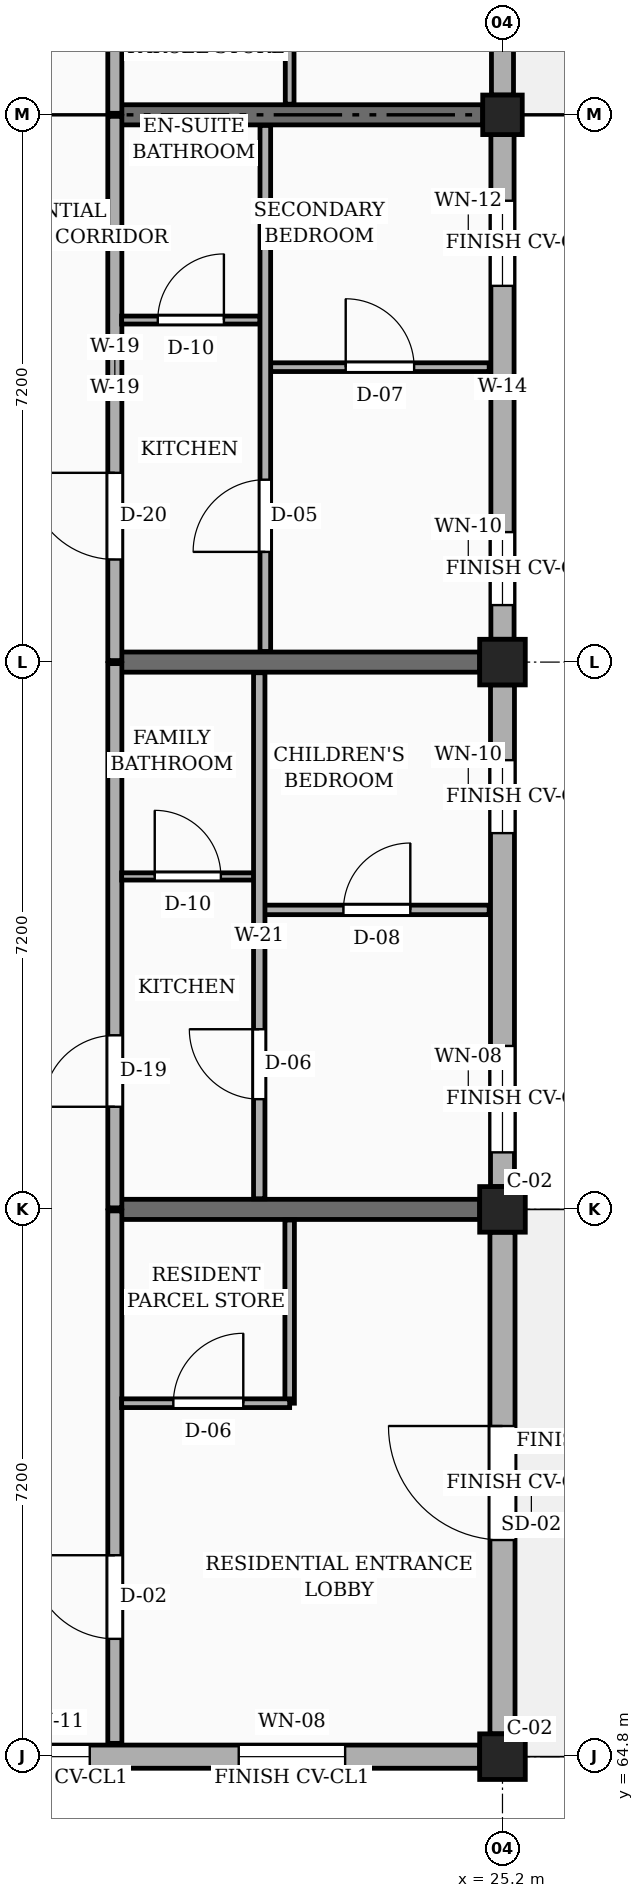
"""IFC4 building model, lengths in metres.
Left out: names, types, materials, properties, quantities, classifications, styles, units other than length and angle.
Written with IfcOpenShell. Run it as: python <this file> out.ifc"""

import sys

from ifc_helpers import new_model, si_unit, direction, frame, frame_2d, origin, origin_2d, place, context, subcontext, project, spatial, rectangle, circle, extrude, element, fill, save


model = new_model("IFC4")
c1 = context("Model", 3, precision=1e-05, world=origin(), true_north=direction((0.0, 1.0)))
c2 = subcontext(c1, "Body", "Model", "MODEL_VIEW")
j1 = project(units=[si_unit("LENGTHUNIT", "METRE"), si_unit("PLANEANGLEUNIT", "RADIAN")], contexts=[c1])
p1 = place(None, origin())
s1 = spatial("IfcSite", under=j1, at=p1, CompositionType="ELEMENT")
p2 = place(p1, origin())
s2 = spatial("IfcBuilding", under=s1, at=p2, CompositionType="ELEMENT")
p3 = place(p2, origin())
s3 = spatial("IfcBuildingStorey", under=s2, at=p3, CompositionType="ELEMENT", Elevation=0.0)
for number, where, z_axis, x_axis in (
    (1, (25.2, 64.8, 0.0), (0.0, 0.0, 1.0), (1.0, 0.0, 0.0)),
    (2, (25.2, 72.0, 0.0), (0.0, 0.0, 1.0), (1.0, 0.0, 0.0)),
    (3, (25.2, 79.2, 0.0), (0.0, 0.0, 1.0), (1.0, 0.0, 0.0)),
):
    element("IfcColumn", number, at=place(p3, frame(where, z_axis=z_axis, x_axis=x_axis)), inside=s3, PredefinedType="COLUMN", context=c2, shape_type="SweptSolid", body=[
        extrude(rectangle(XDim=0.6, YDim=0.6, at=origin_2d()), origin(), (0.0, 0.0, 1.0), 4.5),
    ])
p4 = place(p3, frame((25.2, 86.4, 0.0), z_axis=(0.0, 0.0, 1.0), x_axis=(1.0, 0.0, 0.0)))
e4 = element("IfcColumn", 4, at=p4, inside=s3, PredefinedType="COLUMN", context=c2, shape_type="SweptSolid", body=[
    extrude(circle(Radius=0.26, at=origin_2d()), origin(), (0.0, 0.0, 1.0), 4.5),
])
for number, where, z_axis, x_axis in (
    (5, (20.1, 72.0, 0.0), (0.0, 0.0, 1.0), (1.0, 0.0, 0.0)),
    (6, (20.1, 79.2, 0.0), (0.0, 0.0, 1.0), (1.0, 0.0, 0.0)),
):
    element("IfcWall", number, at=place(p3, frame(where, z_axis=z_axis, x_axis=x_axis)), inside=s3, PredefinedType="SOLIDWALL", context=c2, shape_type="SweptSolid", body=[
        extrude(rectangle(XDim=4.8, YDim=0.265, at=frame_2d((2.4, 0.0))), origin(), (0.0, 0.0, 1.0), 3.56),
    ])
p5 = place(p3, frame((20.1, 86.4, 0.0), z_axis=(0.0, 0.0, 1.0), x_axis=(1.0, 0.0, 0.0)))
e7 = element("IfcWall", 7, at=p5, inside=s3, PredefinedType="SOLIDWALL", context=c2, shape_type="SweptSolid", body=[
    extrude(rectangle(XDim=4.84, YDim=0.265, at=frame_2d((2.42, 0.0))), origin(), (0.0, 0.0, 1.0), 3.56),
])
p6 = place(p3, frame((18.26, 64.8, 0.0), z_axis=(0.0, 0.0, 1.0), x_axis=(1.0, 0.0, 0.0)))
e8 = element("IfcWall", 8, at=p6, inside=s3, PredefinedType="SOLIDWALL", context=c2, shape_type="SweptSolid", body=[
    extrude(rectangle(XDim=6.64, YDim=0.305, at=frame_2d((3.32, 0.0))), origin(), (0.0, 0.0, 1.0), 3.83),
])
p7 = place(p6, frame((0.47, 0.0, 0.78)))
e9 = element("IfcOpeningElement", 9, at=p7, cuts=e8, PredefinedType="OPENING", context=c2, shape_type="SweptSolid", body=[
    extrude(rectangle(XDim=1.04, YDim=1.26, at=frame_2d((0.52, 0.63))), frame((0.0, 0.163, 0.0), z_axis=(0.0, -1.0, 0.0), x_axis=(1.0, 0.0, 0.0)), (0.0, 0.0, 1.0), 0.325),
])
p8 = place(p6, frame((3.47, 0.0, 0.78)))
e10 = element("IfcOpeningElement", 10, at=p8, cuts=e8, PredefinedType="OPENING", context=c2, shape_type="SweptSolid", body=[
    extrude(rectangle(XDim=1.4, YDim=1.15, at=frame_2d((0.7, 0.575))), frame((0.0, 0.163, 0.0), z_axis=(0.0, -1.0, 0.0), x_axis=(1.0, 0.0, 0.0)), (0.0, 0.0, 1.0), 0.325),
])
p9 = place(p3, frame((25.2, 65.1, 0.0), z_axis=(0.0, 0.0, 1.0), x_axis=(0.0, 1.0, 0.0)))
e11 = element("IfcWall", 11, at=p9, inside=s3, PredefinedType="SOLIDWALL", context=c2, shape_type="SweptSolid", body=[
    extrude(rectangle(XDim=6.6, YDim=0.33, at=frame_2d((3.3, 0.0))), origin(), (0.0, 0.0, 1.0), 3.83),
])
p10 = place(p9, frame((2.55, 0.0, 0.0)))
e12 = element("IfcOpeningElement", 12, at=p10, cuts=e11, PredefinedType="OPENING", context=c2, shape_type="SweptSolid", body=[
    extrude(rectangle(XDim=1.5, YDim=2.2, at=frame_2d((0.75, 1.1))), frame((0.0, 0.175, 0.0), z_axis=(0.0, -1.0, 0.0), x_axis=(1.0, 0.0, 0.0)), (0.0, 0.0, 1.0), 0.35),
])
p11 = place(p3, frame((25.2, 72.3, 0.0), z_axis=(0.0, 0.0, 1.0), x_axis=(0.0, 1.0, 0.0)))
e13 = element("IfcWall", 13, at=p11, inside=s3, PredefinedType="SOLIDWALL", context=c2, shape_type="SweptSolid", body=[
    extrude(rectangle(XDim=6.6, YDim=0.315, at=frame_2d((3.3, 0.0))), origin(), (0.0, 0.0, 1.0), 3.83),
])
p12 = place(p11, frame((0.45, 0.0, 0.78)))
e14 = element("IfcOpeningElement", 14, at=p12, cuts=e13, PredefinedType="OPENING", context=c2, shape_type="SweptSolid", body=[
    extrude(rectangle(XDim=1.4, YDim=1.15, at=frame_2d((0.7, 0.575))), frame((0.0, 0.167, 0.0), z_axis=(0.0, -1.0, 0.0), x_axis=(1.0, 0.0, 0.0)), (0.0, 0.0, 1.0), 0.335),
])
p13 = place(p11, frame((4.65, 0.0, 0.78)))
e15 = element("IfcOpeningElement", 15, at=p13, cuts=e13, PredefinedType="OPENING", context=c2, shape_type="SweptSolid", body=[
    extrude(rectangle(XDim=0.96, YDim=1.26, at=frame_2d((0.48, 0.63))), frame((0.0, 0.167, 0.0), z_axis=(0.0, -1.0, 0.0), x_axis=(1.0, 0.0, 0.0)), (0.0, 0.0, 1.0), 0.335),
])
p14 = place(p3, frame((25.2, 79.5, 0.0), z_axis=(0.0, 0.0, 1.0), x_axis=(0.0, 1.0, 0.0)))
e16 = element("IfcWall", 16, at=p14, inside=s3, PredefinedType="SOLIDWALL", context=c2, shape_type="SweptSolid", body=[
    extrude(rectangle(XDim=6.64, YDim=0.305, at=frame_2d((3.32, 0.0))), origin(), (0.0, 0.0, 1.0), 3.83),
])
p15 = place(p14, frame((0.45, 0.0, 0.78)))
e17 = element("IfcOpeningElement", 17, at=p15, cuts=e16, PredefinedType="OPENING", context=c2, shape_type="SweptSolid", body=[
    extrude(rectangle(XDim=0.96, YDim=1.26, at=frame_2d((0.48, 0.63))), frame((0.0, 0.163, 0.0), z_axis=(0.0, -1.0, 0.0), x_axis=(1.0, 0.0, 0.0)), (0.0, 0.0, 1.0), 0.325),
])
p16 = place(p14, frame((4.65, 0.0, 0.78)))
e18 = element("IfcOpeningElement", 18, at=p16, cuts=e16, PredefinedType="OPENING", context=c2, shape_type="SweptSolid", body=[
    extrude(rectangle(XDim=1.12, YDim=1.26, at=frame_2d((0.56, 0.63))), frame((0.0, 0.163, 0.0), z_axis=(0.0, -1.0, 0.0), x_axis=(1.0, 0.0, 0.0)), (0.0, 0.0, 1.0), 0.325),
])
p17 = place(p3, frame((25.2, 86.66, 0.0), z_axis=(0.0, 0.0, 1.0), x_axis=(0.0, 1.0, 0.0)))
e19 = element("IfcWall", 19, at=p17, inside=s3, PredefinedType="SOLIDWALL", context=c2, shape_type="SweptSolid", body=[
    extrude(rectangle(XDim=6.64, YDim=0.29, at=frame_2d((3.32, 0.0))), origin(), (0.0, 0.0, 1.0), 3.83),
])
p18 = place(p17, frame((2.695, 0.0, 0.0)))
e20 = element("IfcOpeningElement", 20, at=p18, cuts=e19, PredefinedType="OPENING", context=c2, shape_type="SweptSolid", body=[
    extrude(rectangle(XDim=1.25, YDim=2.15, at=frame_2d((0.625, 1.075))), frame((0.0, 0.155, 0.0), z_axis=(0.0, -1.0, 0.0), x_axis=(1.0, 0.0, 0.0)), (0.0, 0.0, 1.0), 0.31),
])
p19 = place(p3, frame((20.1, 64.975, 0.0), z_axis=(0.0, 0.0, 1.0), x_axis=(0.0, 1.0, 0.0)))
e21 = element("IfcWall", 21, at=p19, inside=s3, PredefinedType="PARTITIONING", context=c2, shape_type="SweptSolid", body=[
    extrude(rectangle(XDim=7.005, YDim=0.185, at=frame_2d((3.502, 0.0))), origin(), (0.0, 0.0, 1.0), 3.695),
])
p20 = place(p19, frame((1.375, 0.0, 0.0)))
e22 = element("IfcOpeningElement", 22, at=p20, cuts=e21, PredefinedType="OPENING", context=c2, shape_type="SweptSolid", body=[
    extrude(rectangle(XDim=1.1, YDim=2.15, at=frame_2d((0.55, 1.075))), frame((0.0, 0.103, 0.0), z_axis=(0.0, -1.0, 0.0), x_axis=(1.0, 0.0, 0.0)), (0.0, 0.0, 1.0), 0.205),
])
p21 = place(p3, frame((20.1, 72.02, 0.0), z_axis=(0.0, 0.0, 1.0), x_axis=(0.0, 1.0, 0.0)))
e23 = element("IfcWall", 23, at=p21, inside=s3, PredefinedType="PARTITIONING", context=c2, shape_type="SweptSolid", body=[
    extrude(rectangle(XDim=7.16, YDim=0.185, at=frame_2d((3.58, 0.0))), origin(), (0.0, 0.0, 1.0), 3.695),
])
p22 = place(p21, frame((1.33, 0.0, 0.0)))
e24 = element("IfcOpeningElement", 24, at=p22, cuts=e23, PredefinedType="OPENING", context=c2, shape_type="SweptSolid", body=[
    extrude(rectangle(XDim=0.94, YDim=2.12, at=frame_2d((0.47, 1.06))), frame((0.0, 0.103, 0.0), z_axis=(0.0, -1.0, 0.0), x_axis=(1.0, 0.0, 0.0)), (0.0, 0.0, 1.0), 0.205),
])
p23 = place(p3, frame((20.1, 79.22, 0.0), z_axis=(0.0, 0.0, 1.0), x_axis=(0.0, 1.0, 0.0)))
e25 = element("IfcWall", 25, at=p23, inside=s3, PredefinedType="PARTITIONING", context=c2, shape_type="SweptSolid", body=[
    extrude(rectangle(XDim=7.16, YDim=0.185, at=frame_2d((3.58, 0.0))), origin(), (0.0, 0.0, 1.0), 3.695),
])
p24 = place(p23, frame((1.33, 0.0, 0.0)))
e26 = element("IfcOpeningElement", 26, at=p24, cuts=e25, PredefinedType="OPENING", context=c2, shape_type="SweptSolid", body=[
    extrude(rectangle(XDim=1.14, YDim=2.18, at=frame_2d((0.57, 1.09))), frame((0.0, 0.103, 0.0), z_axis=(0.0, -1.0, 0.0), x_axis=(1.0, 0.0, 0.0)), (0.0, 0.0, 1.0), 0.205),
])
p25 = place(p3, frame((20.1, 86.42, 0.0), z_axis=(0.0, 0.0, 1.0), x_axis=(0.0, 1.0, 0.0)))
e27 = element("IfcWall", 27, at=p25, inside=s3, PredefinedType="PARTITIONING", context=c2, shape_type="SweptSolid", body=[
    extrude(rectangle(XDim=7.16, YDim=0.185, at=frame_2d((3.58, 0.0))), origin(), (0.0, 0.0, 1.0), 3.695),
])
p26 = place(p25, frame((4.33, 0.0, 0.0)))
e28 = element("IfcOpeningElement", 28, at=p26, cuts=e27, PredefinedType="OPENING", context=c2, shape_type="SweptSolid", body=[
    extrude(rectangle(XDim=1.1, YDim=2.15, at=frame_2d((0.55, 1.075))), frame((0.0, 0.103, 0.0), z_axis=(0.0, -1.0, 0.0), x_axis=(1.0, 0.0, 0.0)), (0.0, 0.0, 1.0), 0.205),
])
p27 = place(p3, frame((22.4, 69.45, 0.0), z_axis=(0.0, 0.0, 1.0), x_axis=(0.0, 1.0, 0.0)))
e29 = element("IfcWall", 29, at=p27, inside=s3, PredefinedType="PARTITIONING", context=c2, shape_type="SweptSolid", body=[
    extrude(rectangle(XDim=2.41, YDim=0.125, at=frame_2d((1.205, 0.0))), origin(), (0.0, 0.0, 1.0), 3.695),
])
p28 = place(p3, frame((20.19, 69.45, 0.0), z_axis=(0.0, 0.0, 1.0), x_axis=(1.0, 0.0, 0.0)))
e30 = element("IfcWall", 30, at=p28, inside=s3, PredefinedType="PARTITIONING", context=c2, shape_type="SweptSolid", body=[
    extrude(rectangle(XDim=2.21, YDim=0.115, at=frame_2d((1.105, 0.0))), origin(), (0.0, 0.0, 1.0), 3.695),
])
p29 = place(p28, frame((0.68, 0.0, 0.0)))
e31 = element("IfcOpeningElement", 31, at=p29, cuts=e30, PredefinedType="OPENING", context=c2, shape_type="SweptSolid", body=[
    extrude(rectangle(XDim=0.92, YDim=2.1, at=frame_2d((0.46, 1.05))), frame((0.0, 0.067, 0.0), z_axis=(0.0, -1.0, 0.0), x_axis=(1.0, 0.0, 0.0)), (0.0, 0.0, 1.0), 0.135),
])
p30 = place(p3, frame((22.07, 75.94, 0.0), z_axis=(0.0, 0.0, 1.0), x_axis=(1.0, 0.0, 0.0)))
e32 = element("IfcWall", 32, at=p30, inside=s3, PredefinedType="PARTITIONING", context=c2, shape_type="SweptSolid", body=[
    extrude(rectangle(XDim=2.955, YDim=0.125, at=frame_2d((1.478, 0.0))), origin(), (0.0, 0.0, 1.0), 3.695),
])
p31 = place(p30, frame((1.038, 0.0, 0.0)))
e33 = element("IfcOpeningElement", 33, at=p31, cuts=e32, PredefinedType="OPENING", context=c2, shape_type="SweptSolid", body=[
    extrude(rectangle(XDim=0.88, YDim=2.08, at=frame_2d((0.44, 1.04))), frame((0.0, 0.073, 0.0), z_axis=(0.0, -1.0, 0.0), x_axis=(1.0, 0.0, 0.0)), (0.0, 0.0, 1.0), 0.145),
])
p32 = place(p3, frame((20.19, 76.38, 0.0), z_axis=(0.0, 0.0, 1.0), x_axis=(1.0, 0.0, 0.0)))
e34 = element("IfcWall", 34, at=p32, inside=s3, PredefinedType="PARTITIONING", context=c2, shape_type="SweptSolid", body=[
    extrude(rectangle(XDim=1.74, YDim=0.095, at=frame_2d((0.87, 0.0))), origin(), (0.0, 0.0, 1.0), 3.695),
])
p33 = place(p32, frame((0.435, 0.0, 0.0)))
e35 = element("IfcOpeningElement", 35, at=p33, cuts=e34, PredefinedType="OPENING", context=c2, shape_type="SweptSolid", body=[
    extrude(rectangle(XDim=0.87, YDim=2.05, at=frame_2d((0.435, 1.025))), frame((0.0, 0.058, 0.0), z_axis=(0.0, -1.0, 0.0), x_axis=(1.0, 0.0, 0.0)), (0.0, 0.0, 1.0), 0.115),
])
p34 = place(p3, frame((22.0, 72.14, 0.0), z_axis=(0.0, 0.0, 1.0), x_axis=(0.0, 1.0, 0.0)))
e36 = element("IfcWall", 36, at=p34, inside=s3, PredefinedType="PARTITIONING", context=c2, shape_type="SweptSolid", body=[
    extrude(rectangle(XDim=6.92, YDim=0.15, at=frame_2d((3.46, 0.0))), origin(), (0.0, 0.0, 1.0), 3.695),
])
p35 = place(p34, frame((1.31, 0.0, 0.0)))
e37 = element("IfcOpeningElement", 37, at=p35, cuts=e36, PredefinedType="OPENING", context=c2, shape_type="SweptSolid", body=[
    extrude(rectangle(XDim=0.92, YDim=2.1, at=frame_2d((0.46, 1.05))), frame((0.0, 0.085, 0.0), z_axis=(0.0, -1.0, 0.0), x_axis=(1.0, 0.0, 0.0)), (0.0, 0.0, 1.0), 0.17),
])
p36 = place(p3, frame((22.15, 83.08, 0.0), z_axis=(0.0, 0.0, 1.0), x_axis=(1.0, 0.0, 0.0)))
e38 = element("IfcWall", 38, at=p36, inside=s3, PredefinedType="PARTITIONING", context=c2, shape_type="SweptSolid", body=[
    extrude(rectangle(XDim=2.875, YDim=0.115, at=frame_2d((1.438, 0.0))), origin(), (0.0, 0.0, 1.0), 3.695),
])
p37 = place(p36, frame((0.988, 0.0, 0.0)))
e39 = element("IfcOpeningElement", 39, at=p37, cuts=e38, PredefinedType="OPENING", context=c2, shape_type="SweptSolid", body=[
    extrude(rectangle(XDim=0.9, YDim=2.1, at=frame_2d((0.45, 1.05))), frame((0.0, 0.067, 0.0), z_axis=(0.0, -1.0, 0.0), x_axis=(1.0, 0.0, 0.0)), (0.0, 0.0, 1.0), 0.135),
])
p38 = place(p3, frame((20.19, 83.7, 0.0), z_axis=(0.0, 0.0, 1.0), x_axis=(1.0, 0.0, 0.0)))
e40 = element("IfcWall", 40, at=p38, inside=s3, PredefinedType="PARTITIONING", context=c2, shape_type="SweptSolid", body=[
    extrude(rectangle(XDim=1.82, YDim=0.105, at=frame_2d((0.91, 0.0))), origin(), (0.0, 0.0, 1.0), 3.695),
])
p39 = place(p38, frame((0.475, 0.0, 0.0)))
e41 = element("IfcOpeningElement", 41, at=p39, cuts=e40, PredefinedType="OPENING", context=c2, shape_type="SweptSolid", body=[
    extrude(rectangle(XDim=0.87, YDim=2.05, at=frame_2d((0.435, 1.025))), frame((0.0, 0.062, 0.0), z_axis=(0.0, -1.0, 0.0), x_axis=(1.0, 0.0, 0.0)), (0.0, 0.0, 1.0), 0.125),
])
p40 = place(p3, frame((22.08, 79.34, 0.0), z_axis=(0.0, 0.0, 1.0), x_axis=(0.0, 1.0, 0.0)))
e42 = element("IfcWall", 42, at=p40, inside=s3, PredefinedType="PARTITIONING", context=c2, shape_type="SweptSolid", body=[
    extrude(rectangle(XDim=6.92, YDim=0.14, at=frame_2d((3.46, 0.0))), origin(), (0.0, 0.0, 1.0), 3.695),
])
p41 = place(p40, frame((1.31, 0.0, 0.0)))
e43 = element("IfcOpeningElement", 43, at=p41, cuts=e42, PredefinedType="OPENING", context=c2, shape_type="SweptSolid", body=[
    extrude(rectangle(XDim=0.95, YDim=2.1, at=frame_2d((0.475, 1.05))), frame((0.0, 0.08, 0.0), z_axis=(0.0, -1.0, 0.0), x_axis=(1.0, 0.0, 0.0)), (0.0, 0.0, 1.0), 0.16),
])
p42 = place(p3, frame((22.4, 86.54, 0.0), z_axis=(0.0, 0.0, 1.0), x_axis=(0.0, 1.0, 0.0)))
e44 = element("IfcWall", 44, at=p42, inside=s3, PredefinedType="PARTITIONING", context=c2, shape_type="SweptSolid", body=[
    extrude(rectangle(XDim=2.41, YDim=0.115, at=frame_2d((1.205, 0.0))), origin(), (0.0, 0.0, 1.0), 3.695),
])
p43 = place(p7, origin())
e45 = element("IfcWindow", 45, at=p43, inside=s3, PartitioningType="SINGLE_PANEL", PredefinedType="WINDOW", context=c2, shape_type="SweptSolid", body=[
    extrude(rectangle(XDim=1.04, YDim=1.26, at=frame_2d((0.52, 0.63))), frame((0.0, 0.03, 0.0), z_axis=(0.0, -1.0, 0.0), x_axis=(1.0, 0.0, 0.0)), (0.0, 0.0, 1.0), 0.06),
])
fill(e9, e45)
p44 = place(p8, origin())
e46 = element("IfcWindow", 46, at=p44, inside=s3, PartitioningType="SINGLE_PANEL", PredefinedType="WINDOW", context=c2, shape_type="SweptSolid", body=[
    extrude(rectangle(XDim=1.4, YDim=1.15, at=frame_2d((0.7, 0.575))), frame((0.0, 0.03, 0.0), z_axis=(0.0, -1.0, 0.0), x_axis=(1.0, 0.0, 0.0)), (0.0, 0.0, 1.0), 0.06),
])
fill(e10, e46)
p45 = place(p10, frame((1.5, 0.0, 0.0), z_axis=(0.0, 0.0, 1.0), x_axis=(-1.0, 0.0, 0.0)))
e47 = element("IfcDoor", 47, at=p45, inside=s3, OperationType="SINGLE_SWING_RIGHT", PredefinedType="DOOR", context=c2, shape_type="SweptSolid", body=[
    extrude(rectangle(XDim=1.5, YDim=2.2, at=frame_2d((0.75, 1.1))), frame((0.0, 0.025, 0.0), z_axis=(0.0, -1.0, 0.0), x_axis=(1.0, 0.0, 0.0)), (0.0, 0.0, 1.0), 0.05),
])
fill(e12, e47)
p46 = place(p12, origin())
e48 = element("IfcWindow", 48, at=p46, inside=s3, PartitioningType="SINGLE_PANEL", PredefinedType="WINDOW", context=c2, shape_type="SweptSolid", body=[
    extrude(rectangle(XDim=1.4, YDim=1.15, at=frame_2d((0.7, 0.575))), frame((0.0, 0.03, 0.0), z_axis=(0.0, -1.0, 0.0), x_axis=(1.0, 0.0, 0.0)), (0.0, 0.0, 1.0), 0.06),
])
fill(e14, e48)
p47 = place(p13, origin())
e49 = element("IfcWindow", 49, at=p47, inside=s3, PartitioningType="SINGLE_PANEL", PredefinedType="WINDOW", context=c2, shape_type="SweptSolid", body=[
    extrude(rectangle(XDim=0.96, YDim=1.26, at=frame_2d((0.48, 0.63))), frame((0.0, 0.03, 0.0), z_axis=(0.0, -1.0, 0.0), x_axis=(1.0, 0.0, 0.0)), (0.0, 0.0, 1.0), 0.06),
])
fill(e15, e49)
p48 = place(p15, origin())
e50 = element("IfcWindow", 50, at=p48, inside=s3, PartitioningType="SINGLE_PANEL", PredefinedType="WINDOW", context=c2, shape_type="SweptSolid", body=[
    extrude(rectangle(XDim=0.96, YDim=1.26, at=frame_2d((0.48, 0.63))), frame((0.0, 0.03, 0.0), z_axis=(0.0, -1.0, 0.0), x_axis=(1.0, 0.0, 0.0)), (0.0, 0.0, 1.0), 0.06),
])
fill(e17, e50)
p49 = place(p16, origin())
e51 = element("IfcWindow", 51, at=p49, inside=s3, PartitioningType="SINGLE_PANEL", PredefinedType="WINDOW", context=c2, shape_type="SweptSolid", body=[
    extrude(rectangle(XDim=1.12, YDim=1.26, at=frame_2d((0.56, 0.63))), frame((0.0, 0.03, 0.0), z_axis=(0.0, -1.0, 0.0), x_axis=(1.0, 0.0, 0.0)), (0.0, 0.0, 1.0), 0.06),
])
fill(e18, e51)
p50 = place(p20, origin())
e52 = element("IfcDoor", 52, at=p50, inside=s3, OperationType="SINGLE_SWING_RIGHT", PredefinedType="DOOR", context=c2, shape_type="SweptSolid", body=[
    extrude(rectangle(XDim=1.1, YDim=2.15, at=frame_2d((0.55, 1.075))), frame((0.0, 0.025, 0.0), z_axis=(0.0, -1.0, 0.0), x_axis=(1.0, 0.0, 0.0)), (0.0, 0.0, 1.0), 0.05),
])
fill(e22, e52)
p51 = place(p22, origin())
e53 = element("IfcDoor", 53, at=p51, inside=s3, OperationType="SINGLE_SWING_LEFT", PredefinedType="DOOR", context=c2, shape_type="SweptSolid", body=[
    extrude(rectangle(XDim=0.94, YDim=2.12, at=frame_2d((0.47, 1.06))), frame((0.0, 0.025, 0.0), z_axis=(0.0, -1.0, 0.0), x_axis=(1.0, 0.0, 0.0)), (0.0, 0.0, 1.0), 0.05),
])
fill(e24, e53)
p52 = place(p24, origin())
e54 = element("IfcDoor", 54, at=p52, inside=s3, OperationType="SINGLE_SWING_RIGHT", PredefinedType="DOOR", context=c2, shape_type="SweptSolid", body=[
    extrude(rectangle(XDim=1.14, YDim=2.18, at=frame_2d((0.57, 1.09))), frame((0.0, 0.025, 0.0), z_axis=(0.0, -1.0, 0.0), x_axis=(1.0, 0.0, 0.0)), (0.0, 0.0, 1.0), 0.05),
])
fill(e26, e54)
p53 = place(p29, origin())
e55 = element("IfcDoor", 55, at=p53, inside=s3, OperationType="SINGLE_SWING_RIGHT", PredefinedType="DOOR", context=c2, shape_type="SweptSolid", body=[
    extrude(rectangle(XDim=0.92, YDim=2.1, at=frame_2d((0.46, 1.05))), frame((0.0, 0.025, 0.0), z_axis=(0.0, -1.0, 0.0), x_axis=(1.0, 0.0, 0.0)), (0.0, 0.0, 1.0), 0.05),
])
fill(e31, e55)
p54 = place(p31, origin())
e56 = element("IfcDoor", 56, at=p54, inside=s3, OperationType="SINGLE_SWING_RIGHT", PredefinedType="DOOR", context=c2, shape_type="SweptSolid", body=[
    extrude(rectangle(XDim=0.88, YDim=2.08, at=frame_2d((0.44, 1.04))), frame((0.0, 0.025, 0.0), z_axis=(0.0, -1.0, 0.0), x_axis=(1.0, 0.0, 0.0)), (0.0, 0.0, 1.0), 0.05),
])
fill(e33, e56)
p55 = place(p33, origin())
e57 = element("IfcDoor", 57, at=p55, inside=s3, OperationType="SINGLE_SWING_LEFT", PredefinedType="DOOR", context=c2, shape_type="SweptSolid", body=[
    extrude(rectangle(XDim=0.87, YDim=2.05, at=frame_2d((0.435, 1.025))), frame((0.0, 0.025, 0.0), z_axis=(0.0, -1.0, 0.0), x_axis=(1.0, 0.0, 0.0)), (0.0, 0.0, 1.0), 0.05),
])
fill(e35, e57)
p56 = place(p35, origin())
e58 = element("IfcDoor", 58, at=p56, inside=s3, OperationType="SINGLE_SWING_RIGHT", PredefinedType="DOOR", context=c2, shape_type="SweptSolid", body=[
    extrude(rectangle(XDim=0.92, YDim=2.1, at=frame_2d((0.46, 1.05))), frame((0.0, 0.025, 0.0), z_axis=(0.0, -1.0, 0.0), x_axis=(1.0, 0.0, 0.0)), (0.0, 0.0, 1.0), 0.05),
])
fill(e37, e58)
p57 = place(p37, origin())
e59 = element("IfcDoor", 59, at=p57, inside=s3, OperationType="SINGLE_SWING_LEFT", PredefinedType="DOOR", context=c2, shape_type="SweptSolid", body=[
    extrude(rectangle(XDim=0.9, YDim=2.1, at=frame_2d((0.45, 1.05))), frame((0.0, 0.025, 0.0), z_axis=(0.0, -1.0, 0.0), x_axis=(1.0, 0.0, 0.0)), (0.0, 0.0, 1.0), 0.05),
])
fill(e39, e59)
p58 = place(p39, origin())
e60 = element("IfcDoor", 60, at=p58, inside=s3, OperationType="SINGLE_SWING_RIGHT", PredefinedType="DOOR", context=c2, shape_type="SweptSolid", body=[
    extrude(rectangle(XDim=0.87, YDim=2.05, at=frame_2d((0.435, 1.025))), frame((0.0, 0.025, 0.0), z_axis=(0.0, -1.0, 0.0), x_axis=(1.0, 0.0, 0.0)), (0.0, 0.0, 1.0), 0.05),
])
fill(e41, e60)
p59 = place(p41, origin())
e61 = element("IfcDoor", 61, at=p59, inside=s3, OperationType="SINGLE_SWING_LEFT", PredefinedType="DOOR", context=c2, shape_type="SweptSolid", body=[
    extrude(rectangle(XDim=0.95, YDim=2.1, at=frame_2d((0.475, 1.05))), frame((0.0, 0.025, 0.0), z_axis=(0.0, -1.0, 0.0), x_axis=(1.0, 0.0, 0.0)), (0.0, 0.0, 1.0), 0.05),
])
fill(e43, e61)
save(model, sys.argv[1])
